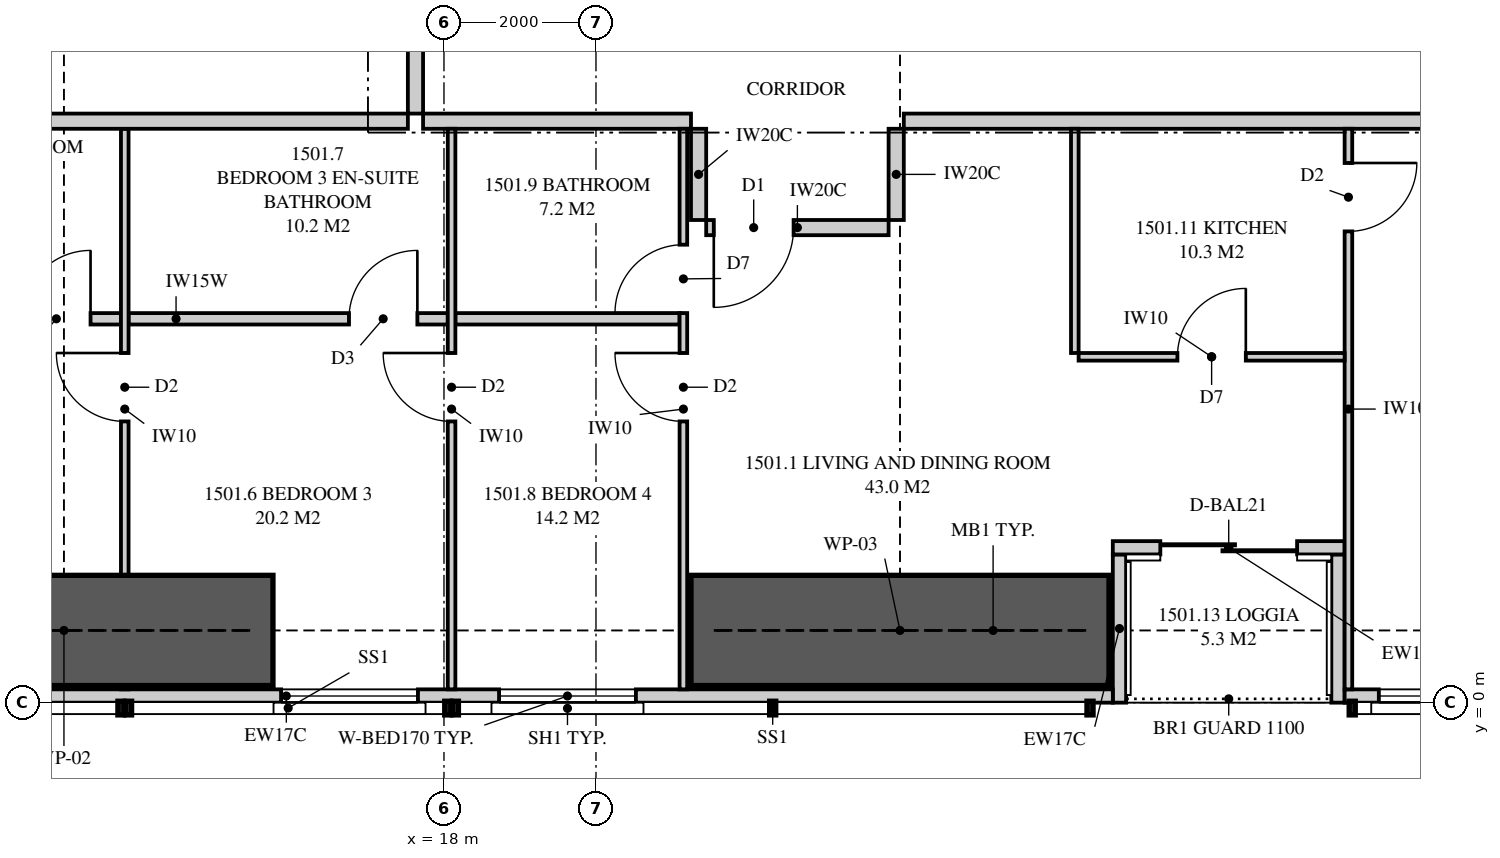
"""IFC4 building model, lengths in metres.
Left out: names, types, materials, properties, quantities, classifications, styles, units other than length and angle.
Written with IfcOpenShell. Run it as: python <this file> out.ifc"""

import sys

from ifc_helpers import new_model, si_unit, direction, frame, frame_2d, origin, place, context, subcontext, project, spatial, polyline, rectangle, outline, extrude, element, fill, save


model = new_model("IFC4")
c1 = context("Model", 3, precision=1e-05, world=origin(), true_north=direction((0.0, 1.0)))
c2 = subcontext(c1, "Body", "Model", "MODEL_VIEW")
j1 = project(units=[si_unit("LENGTHUNIT", "METRE"), si_unit("PLANEANGLEUNIT", "RADIAN")], contexts=[c1])
p1 = place(None, origin())
s1 = spatial("IfcSite", under=j1, at=p1, CompositionType="ELEMENT")
p2 = place(p1, origin())
s2 = spatial("IfcBuilding", under=s1, at=p2, CompositionType="ELEMENT")
p3 = place(p2, frame((0.0, 0.0, 57.85)))
s3 = spatial("IfcBuildingStorey", under=s2, at=p3, CompositionType="ELEMENT", Elevation=57.85)
p4 = place(p3, frame((5.051, 0.087, 0.0), z_axis=(0.0, 0.0, 1.0), x_axis=(1.0, 0.0, 0.0)))
e1 = element("IfcWall", 1, at=p4, inside=s3, PredefinedType="SOLIDWALL", context=c2, shape_type="SweptSolid", body=[
    extrude(outline(polyline([(0.0, 0.0), (21.749, 0.0), (21.749, 2.15), (7.949, 2.15), (7.949, 3.11), (7.793, 3.11), (7.793, 2.15), (7.745, 2.15), (7.745, 3.11), (0.0, 3.11), (0.0, 0.0)])), frame((0.0, 0.087, 0.0), z_axis=(0.0, -1.0, 0.0), x_axis=(1.0, 0.0, 0.0)), (0.0, 0.0, 1.0), 0.175),
])
p5 = place(p4, frame((3.234, 0.0, 0.4)))
e2 = element("IfcOpeningElement", 2, at=p5, cuts=e1, PredefinedType="OPENING", context=c2, shape_type="SweptSolid", body=[
    extrude(rectangle(XDim=1.8, YDim=1.7, at=frame_2d((0.9, 0.85))), frame((0.0, 0.097, 0.0), z_axis=(0.0, -1.0, 0.0), x_axis=(1.0, 0.0, 0.0)), (0.0, 0.0, 1.0), 0.195),
])
p6 = place(p4, frame((10.806, 0.0, 0.4)))
e3 = element("IfcOpeningElement", 3, at=p6, cuts=e1, PredefinedType="OPENING", context=c2, shape_type="SweptSolid", body=[
    extrude(rectangle(XDim=1.8, YDim=1.7, at=frame_2d((0.9, 0.85))), frame((0.0, 0.097, 0.0), z_axis=(0.0, -1.0, 0.0), x_axis=(1.0, 0.0, 0.0)), (0.0, 0.0, 1.0), 0.195),
])
p7 = place(p4, frame((13.674, 0.0, 0.4)))
e4 = element("IfcOpeningElement", 4, at=p7, cuts=e1, PredefinedType="OPENING", context=c2, shape_type="SweptSolid", body=[
    extrude(rectangle(XDim=1.8, YDim=1.7, at=frame_2d((0.9, 0.85))), frame((0.0, 0.097, 0.0), z_axis=(0.0, -1.0, 0.0), x_axis=(1.0, 0.0, 0.0)), (0.0, 0.0, 1.0), 0.195),
])
p8 = place(p3, frame((29.85, 0.087, 0.0), z_axis=(0.0, 0.0, 1.0), x_axis=(1.0, 0.0, 0.0)))
e5 = element("IfcWall", 5, at=p8, inside=s3, PredefinedType="SOLIDWALL", context=c2, shape_type="SweptSolid", body=[
    extrude(outline(polyline([(0.0, 0.0), (8.05, 0.0), (8.05, 3.11), (5.354, 3.11), (5.354, 2.15), (5.306, 2.15), (5.306, 3.11), (5.15, 3.11), (5.15, 2.15), (0.0, 2.15), (0.0, 0.0)])), frame((0.0, 0.087, 0.0), z_axis=(0.0, -1.0, 0.0), x_axis=(1.0, 0.0, 0.0)), (0.0, 0.0, 1.0), 0.175),
])
p9 = place(p8, frame((0.45, 0.0, 0.4)))
e6 = element("IfcOpeningElement", 6, at=p9, cuts=e5, PredefinedType="OPENING", context=c2, shape_type="SweptSolid", body=[
    extrude(rectangle(XDim=1.8, YDim=1.7, at=frame_2d((0.9, 0.85))), frame((0.0, 0.097, 0.0), z_axis=(0.0, -1.0, 0.0), x_axis=(1.0, 0.0, 0.0)), (0.0, 0.0, 1.0), 0.195),
])
p10 = place(p3, frame((26.8, 2.038, 0.0), z_axis=(0.0, 0.0, 1.0), x_axis=(1.0, 0.0, 0.0)))
e7 = element("IfcWall", 7, at=p10, inside=s3, PredefinedType="SOLIDWALL", context=c2, shape_type="SweptSolid", body=[
    extrude(rectangle(XDim=3.05, YDim=0.175, at=frame_2d((1.525, 0.0))), origin(), (0.0, 0.0, 1.0), 3.11),
])
p11 = place(p10, frame((0.625, 0.0, 0.0)))
e8 = element("IfcOpeningElement", 8, at=p11, cuts=e7, PredefinedType="OPENING", context=c2, shape_type="SweptSolid", body=[
    extrude(rectangle(XDim=1.8, YDim=2.1, at=frame_2d((0.9, 1.05))), frame((0.0, 0.097, 0.0), z_axis=(0.0, -1.0, 0.0), x_axis=(1.0, 0.0, 0.0)), (0.0, 0.0, 1.0), 0.195),
])
for number, where, z_axis, x_axis in (
    (9, (26.887, 0.0, 0.0), (0.0, 0.0, 1.0), (0.0, 1.0, 0.0)),
    (10, (29.762, 0.0, 0.0), (0.0, 0.0, 1.0), (0.0, 1.0, 0.0)),
):
    element("IfcWall", number, at=place(p3, frame(where, z_axis=z_axis, x_axis=x_axis)), inside=s3, PredefinedType="SOLIDWALL", context=c2, shape_type="SweptSolid", body=[
        extrude(outline(polyline([(0.0, 0.0), (1.95, 0.0), (1.95, 3.11), (1.75, 3.11), (1.75, 2.15), (0.15, 2.15), (0.15, 3.11), (0.0, 3.11), (0.0, 0.0)])), frame((0.0, 0.087, 0.0), z_axis=(0.0, -1.0, 0.0), x_axis=(1.0, 0.0, 0.0)), (0.0, 0.0, 1.0), 0.175),
    ])
p12 = place(p3, frame((17.725, 7.65, 0.0), z_axis=(0.0, 0.0, 1.0), x_axis=(1.0, 0.0, 0.0)))
e11 = element("IfcWall", 11, at=p12, inside=s3, PredefinedType="PARTITIONING", context=c2, shape_type="SweptSolid", body=[
    extrude(rectangle(XDim=3.525, YDim=0.2, at=frame_2d((1.762, 0.0))), origin(), (0.0, 0.0, 1.0), 3.11),
])
p13 = place(p3, frame((13.8, 0.175, 0.0), z_axis=(0.0, 0.0, 1.0), x_axis=(0.0, 1.0, 0.0)))
e12 = element("IfcWall", 12, at=p13, inside=s3, PredefinedType="PARTITIONING", context=c2, shape_type="SweptSolid", body=[
    extrude(outline(polyline([(1.635, 2.15), (0.0, 2.15), (0.0, 0.0), (7.375, 0.0), (7.375, 3.11), (1.635, 3.11), (1.635, 2.15)]), holes=[polyline([(1.021, 0.133), (0.529, 0.133), (0.529, 0.923), (1.021, 0.923), (1.021, 0.133)]), polyline([(1.021, 1.227), (0.529, 1.227), (0.529, 2.017), (1.021, 2.017), (1.021, 1.227)])]), frame((0.0, 0.05, 0.0), z_axis=(0.0, -1.0, 0.0), x_axis=(1.0, 0.0, 0.0)), (0.0, 0.0, 1.0), 0.1),
])
p14 = place(p13, frame((3.525, 0.0, 0.0)))
e13 = element("IfcOpeningElement", 13, at=p14, cuts=e12, PredefinedType="OPENING", context=c2, shape_type="SweptSolid", body=[
    extrude(rectangle(XDim=0.9, YDim=2.1, at=frame_2d((0.45, 1.05))), frame((0.0, 0.06, 0.0), z_axis=(0.0, -1.0, 0.0), x_axis=(1.0, 0.0, 0.0)), (0.0, 0.0, 1.0), 0.12),
])
p15 = place(p3, frame((18.1, 0.175, 0.0), z_axis=(0.0, 0.0, 1.0), x_axis=(0.0, 1.0, 0.0)))
e14 = element("IfcWall", 14, at=p15, inside=s3, PredefinedType="PARTITIONING", context=c2, shape_type="SweptSolid", body=[
    extrude(outline(polyline([(0.0, 0.0), (7.375, 0.0), (7.375, 3.11), (1.635, 3.11), (1.635, 2.15), (0.0, 2.15), (0.0, 3.11), (0.0, 0.0)])), frame((0.0, 0.05, 0.0), z_axis=(0.0, -1.0, 0.0), x_axis=(1.0, 0.0, 0.0)), (0.0, 0.0, 1.0), 0.1),
])
p16 = place(p15, frame((3.525, 0.0, 0.0)))
e15 = element("IfcOpeningElement", 15, at=p16, cuts=e14, PredefinedType="OPENING", context=c2, shape_type="SweptSolid", body=[
    extrude(rectangle(XDim=0.9, YDim=2.1, at=frame_2d((0.45, 1.05))), frame((0.0, 0.06, 0.0), z_axis=(0.0, -1.0, 0.0), x_axis=(1.0, 0.0, 0.0)), (0.0, 0.0, 1.0), 0.12),
])
p17 = place(p3, frame((21.15, 0.175, 0.0), z_axis=(0.0, 0.0, 1.0), x_axis=(0.0, 1.0, 0.0)))
e16 = element("IfcWall", 16, at=p17, inside=s3, PredefinedType="PARTITIONING", context=c2, shape_type="SweptSolid", body=[
    extrude(outline(polyline([(0.0, 0.0), (7.375, 0.0), (7.375, 3.11), (1.635, 3.11), (1.635, 2.15), (0.0, 2.15), (0.0, 3.11), (0.0, 0.0)])), frame((0.0, 0.05, 0.0), z_axis=(0.0, -1.0, 0.0), x_axis=(1.0, 0.0, 0.0)), (0.0, 0.0, 1.0), 0.1),
])
p18 = place(p17, frame((3.525, 0.0, 0.0)))
e17 = element("IfcOpeningElement", 17, at=p18, cuts=e16, PredefinedType="OPENING", context=c2, shape_type="SweptSolid", body=[
    extrude(rectangle(XDim=0.9, YDim=2.1, at=frame_2d((0.45, 1.05))), frame((0.0, 0.06, 0.0), z_axis=(0.0, -1.0, 0.0), x_axis=(1.0, 0.0, 0.0)), (0.0, 0.0, 1.0), 0.12),
])
p19 = place(p17, frame((4.95, 0.0, 0.0)))
e18 = element("IfcOpeningElement", 18, at=p19, cuts=e16, PredefinedType="OPENING", context=c2, shape_type="SweptSolid", body=[
    extrude(rectangle(XDim=0.9, YDim=2.1, at=frame_2d((0.45, 1.05))), frame((0.0, 0.06, 0.0), z_axis=(0.0, -1.0, 0.0), x_axis=(1.0, 0.0, 0.0)), (0.0, 0.0, 1.0), 0.12),
])
p20 = place(p3, frame((7.85, 5.05, 0.0), z_axis=(0.0, 0.0, 1.0), x_axis=(1.0, 0.0, 0.0)))
e19 = element("IfcWall", 19, at=p20, inside=s3, PredefinedType="PLUMBINGWALL", context=c2, shape_type="SweptSolid", body=[
    extrude(outline(polyline([(0.0, 0.0), (5.9, 0.0), (5.9, 3.11), (5.462, 3.11), (5.462, 2.541), (4.838, 2.541), (4.838, 3.11), (3.635, 3.11), (3.635, 2.51), (1.065, 2.51), (1.065, 3.11), (0.0, 3.11), (0.0, 0.0)])), frame((0.0, 0.075, 0.0), z_axis=(0.0, -1.0, 0.0), x_axis=(1.0, 0.0, 0.0)), (0.0, 0.0, 1.0), 0.15),
])
p21 = place(p20, frame((4.6, 0.0, 0.0)))
e20 = element("IfcOpeningElement", 20, at=p21, cuts=e19, PredefinedType="OPENING", context=c2, shape_type="SweptSolid", body=[
    extrude(rectangle(XDim=0.9, YDim=2.1, at=frame_2d((0.45, 1.05))), frame((0.0, 0.085, 0.0), z_axis=(0.0, -1.0, 0.0), x_axis=(1.0, 0.0, 0.0)), (0.0, 0.0, 1.0), 0.17),
])
p22 = place(p3, frame((13.85, 5.05, 0.0), z_axis=(0.0, 0.0, 1.0), x_axis=(1.0, 0.0, 0.0)))
e21 = element("IfcWall", 21, at=p22, inside=s3, PredefinedType="PLUMBINGWALL", context=c2, shape_type="SweptSolid", body=[
    extrude(rectangle(XDim=4.2, YDim=0.15, at=frame_2d((2.1, 0.0))), origin(), (0.0, 0.0, 1.0), 3.11),
])
p23 = place(p22, frame((2.9, 0.0, 0.0)))
e22 = element("IfcOpeningElement", 22, at=p23, cuts=e21, PredefinedType="OPENING", context=c2, shape_type="SweptSolid", body=[
    extrude(rectangle(XDim=0.9, YDim=2.1, at=frame_2d((0.45, 1.05))), frame((0.0, 0.085, 0.0), z_axis=(0.0, -1.0, 0.0), x_axis=(1.0, 0.0, 0.0)), (0.0, 0.0, 1.0), 0.17),
])
p24 = place(p3, frame((18.15, 5.05, 0.0), z_axis=(0.0, 0.0, 1.0), x_axis=(1.0, 0.0, 0.0)))
e23 = element("IfcWall", 23, at=p24, inside=s3, PredefinedType="PLUMBINGWALL", context=c2, shape_type="SweptSolid", body=[
    extrude(rectangle(XDim=2.95, YDim=0.15, at=frame_2d((1.475, 0.0))), origin(), (0.0, 0.0, 1.0), 3.11),
])
p25 = place(p3, frame((29.9, 0.175, 0.0), z_axis=(0.0, 0.0, 1.0), x_axis=(0.0, 1.0, 0.0)))
e24 = element("IfcWall", 24, at=p25, inside=s3, PredefinedType="PARTITIONING", context=c2, shape_type="SweptSolid", body=[
    extrude(outline(polyline([(0.0, 0.0), (7.375, 0.0), (7.375, 3.11), (1.635, 3.11), (1.635, 2.15), (0.0, 2.15), (0.0, 3.11), (0.0, 0.0)])), frame((0.0, 0.05, 0.0), z_axis=(0.0, -1.0, 0.0), x_axis=(1.0, 0.0, 0.0)), (0.0, 0.0, 1.0), 0.1),
])
p26 = place(p25, frame((6.025, 0.0, 0.0)))
e25 = element("IfcOpeningElement", 25, at=p26, cuts=e24, PredefinedType="OPENING", context=c2, shape_type="SweptSolid", body=[
    extrude(rectangle(XDim=0.9, YDim=2.1, at=frame_2d((0.45, 1.05))), frame((0.0, 0.06, 0.0), z_axis=(0.0, -1.0, 0.0), x_axis=(1.0, 0.0, 0.0)), (0.0, 0.0, 1.0), 0.12),
])
p27 = place(p3, frame((26.35, 4.55, 0.0), z_axis=(0.0, 0.0, 1.0), x_axis=(1.0, 0.0, 0.0)))
e26 = element("IfcWall", 26, at=p27, inside=s3, PredefinedType="PARTITIONING", context=c2, shape_type="SweptSolid", body=[
    extrude(rectangle(XDim=3.5, YDim=0.1, at=frame_2d((1.75, 0.0))), origin(), (0.0, 0.0, 1.0), 3.11),
])
p28 = place(p27, frame((1.3, 0.0, 0.0)))
e27 = element("IfcOpeningElement", 27, at=p28, cuts=e26, PredefinedType="OPENING", context=c2, shape_type="SweptSolid", body=[
    extrude(rectangle(XDim=0.9, YDim=2.1, at=frame_2d((0.45, 1.05))), frame((0.0, 0.06, 0.0), z_axis=(0.0, -1.0, 0.0), x_axis=(1.0, 0.0, 0.0)), (0.0, 0.0, 1.0), 0.12),
])
p29 = place(p3, frame((26.3, 4.6, 0.0), z_axis=(0.0, 0.0, 1.0), x_axis=(0.0, 1.0, 0.0)))
e28 = element("IfcWall", 28, at=p29, inside=s3, PredefinedType="PARTITIONING", context=c2, shape_type="SweptSolid", body=[
    extrude(rectangle(XDim=2.95, YDim=0.1, at=frame_2d((1.475, 0.0))), origin(), (0.0, 0.0, 1.0), 3.11),
])
p30 = place(p3, frame((2.0, 7.65, 0.0), z_axis=(0.0, 0.0, 1.0), x_axis=(1.0, 0.0, 0.0)))
e29 = element("IfcWall", 29, at=p30, inside=s3, PredefinedType="PARTITIONING", context=c2, shape_type="SweptSolid", body=[
    extrude(outline(polyline([(0.0, 0.0), (15.525, 0.0), (15.525, 3.11), (11.337, 3.11), (11.337, 2.541), (10.663, 2.541), (10.663, 3.11), (9.51, 3.11), (9.51, 2.51), (6.89, 2.51), (6.89, 3.11), (2.969, 3.11), (2.969, 2.541), (2.74, 2.541), (2.74, 2.15), (0.896, 2.15), (0.896, 3.11), (0.0, 3.11), (0.0, 0.0)])), frame((0.0, 0.1, 0.0), z_axis=(0.0, -1.0, 0.0), x_axis=(1.0, 0.0, 0.0)), (0.0, 0.0, 1.0), 0.2),
])
p31 = place(p3, frame((17.625, 7.75, 0.0), z_axis=(0.0, 0.0, 1.0), x_axis=(0.0, 1.0, 0.0)))
e30 = element("IfcWall", 30, at=p31, inside=s3, PredefinedType="PARTITIONING", context=c2, shape_type="SweptSolid", body=[
    extrude(outline(polyline([(0.0, 0.0), (16.25, 0.0), (16.25, 3.11), (5.587, 3.11), (5.587, 2.541), (4.913, 2.541), (4.913, 3.11), (0.0, 3.11), (0.0, 0.0)])), frame((0.0, 0.1, 0.0), z_axis=(0.0, -1.0, 0.0), x_axis=(1.0, 0.0, 0.0)), (0.0, 0.0, 1.0), 0.2),
])
p32 = place(p31, frame((7.075, 0.0, 0.0)))
e31 = element("IfcOpeningElement", 31, at=p32, cuts=e30, PredefinedType="OPENING", context=c2, shape_type="SweptSolid", body=[
    extrude(rectangle(XDim=1.05, YDim=2.2, at=frame_2d((0.525, 1.1))), frame((0.0, 0.11, 0.0), z_axis=(0.0, -1.0, 0.0), x_axis=(1.0, 0.0, 0.0)), (0.0, 0.0, 1.0), 0.22),
])
p33 = place(p3, frame((24.05, 7.65, 0.0), z_axis=(0.0, 0.0, 1.0), x_axis=(1.0, 0.0, 0.0)))
e32 = element("IfcWall", 32, at=p33, inside=s3, PredefinedType="PARTITIONING", context=c2, shape_type="SweptSolid", body=[
    extrude(outline(polyline([(0.0, 0.0), (11.65, 0.0), (11.65, 3.11), (11.287, 3.11), (11.287, 2.541), (10.613, 2.541), (10.613, 3.11), (0.287, 3.11), (0.287, 2.541), (0.0, 2.541), (0.0, 3.11), (0.0, 0.0)])), frame((0.0, 0.1, 0.0), z_axis=(0.0, -1.0, 0.0), x_axis=(1.0, 0.0, 0.0)), (0.0, 0.0, 1.0), 0.2),
])
p34 = place(p3, frame((21.45, 6.25, 0.0), z_axis=(0.0, 0.0, 1.0), x_axis=(1.0, 0.0, 0.0)))
e33 = element("IfcWall", 33, at=p34, inside=s3, PredefinedType="PARTITIONING", context=c2, shape_type="SweptSolid", body=[
    extrude(outline(polyline([(0.0, 0.0), (2.4, 0.0), (2.4, 3.11), (2.4, 2.541), (2.213, 2.541), (2.213, 3.11), (0.0, 3.11), (0.0, 0.0)])), frame((0.0, 0.1, 0.0), z_axis=(0.0, -1.0, 0.0), x_axis=(1.0, 0.0, 0.0)), (0.0, 0.0, 1.0), 0.2),
])
p35 = place(p34, frame((0.1, 0.0, 0.0)))
e34 = element("IfcOpeningElement", 34, at=p35, cuts=e33, PredefinedType="OPENING", context=c2, shape_type="SweptSolid", body=[
    extrude(rectangle(XDim=1.05, YDim=2.2, at=frame_2d((0.525, 1.1))), frame((0.0, 0.11, 0.0), z_axis=(0.0, -1.0, 0.0), x_axis=(1.0, 0.0, 0.0)), (0.0, 0.0, 1.0), 0.22),
])
p36 = place(p3, frame((21.35, 7.55, 0.0), z_axis=(0.0, 0.0, 1.0), x_axis=(0.0, -1.0, 0.0)))
e35 = element("IfcWall", 35, at=p36, inside=s3, PredefinedType="PARTITIONING", context=c2, shape_type="SweptSolid", body=[
    extrude(rectangle(XDim=1.2, YDim=0.2, at=frame_2d((0.6, 0.0))), origin(), (0.0, 0.0, 1.0), 3.11),
])
p37 = place(p3, frame((23.95, 7.55, 0.0), z_axis=(0.0, 0.0, 1.0), x_axis=(0.0, -1.0, 0.0)))
e36 = element("IfcWall", 36, at=p37, inside=s3, PredefinedType="PARTITIONING", context=c2, shape_type="SweptSolid", body=[
    extrude(outline(polyline([(0.0, 0.0), (1.2, 0.0), (1.2, 3.11), (1.2, 2.541), (0.0, 2.541), (0.0, 3.11), (0.0, 0.0)])), frame((0.0, 0.1, 0.0), z_axis=(0.0, -1.0, 0.0), x_axis=(1.0, 0.0, 0.0)), (0.0, 0.0, 1.0), 0.2),
])
for number, where, z_axis, x_axis in (
    (37, (10.25, 0.95, 0.0), (0.0, 0.0, 1.0), (1.0, 0.0, 0.0)),
    (38, (21.25, 0.95, 0.0), (0.0, 0.0, 1.0), (1.0, 0.0, 0.0)),
):
    element("IfcWall", number, at=place(p3, frame(where, z_axis=z_axis, x_axis=x_axis)), inside=s3, PredefinedType="SHEAR", context=c2, shape_type="SweptSolid", body=[
        extrude(rectangle(XDim=5.5, YDim=1.45, at=frame_2d((2.75, 0.0))), origin(), (0.0, 0.0, 1.0), 3.35),
    ])
p38 = place(p6, origin())
e39 = element("IfcWindow", 39, at=p38, inside=s3, PartitioningType="SINGLE_PANEL", PredefinedType="WINDOW", context=c2, shape_type="SweptSolid", body=[
    extrude(rectangle(XDim=1.8, YDim=1.7, at=frame_2d((0.9, 0.85))), frame((0.0, 0.03, 0.0), z_axis=(0.0, -1.0, 0.0), x_axis=(1.0, 0.0, 0.0)), (0.0, 0.0, 1.0), 0.06),
])
fill(e3, e39)
p39 = place(p7, origin())
e40 = element("IfcWindow", 40, at=p39, inside=s3, PartitioningType="SINGLE_PANEL", PredefinedType="WINDOW", context=c2, shape_type="SweptSolid", body=[
    extrude(rectangle(XDim=1.8, YDim=1.7, at=frame_2d((0.9, 0.85))), frame((0.0, 0.03, 0.0), z_axis=(0.0, -1.0, 0.0), x_axis=(1.0, 0.0, 0.0)), (0.0, 0.0, 1.0), 0.06),
])
fill(e4, e40)
p40 = place(p11, origin())
e41 = element("IfcDoor", 41, at=p40, inside=s3, OperationType="SLIDING_TO_LEFT", PredefinedType="DOOR", context=c2, shape_type="SweptSolid", body=[
    extrude(rectangle(XDim=1.8, YDim=2.1, at=frame_2d((0.9, 1.05))), frame((0.0, 0.025, 0.0), z_axis=(0.0, -1.0, 0.0), x_axis=(1.0, 0.0, 0.0)), (0.0, 0.0, 1.0), 0.05),
])
fill(e8, e41)
p41 = place(p9, origin())
e42 = element("IfcWindow", 42, at=p41, inside=s3, PartitioningType="SINGLE_PANEL", PredefinedType="WINDOW", context=c2, shape_type="SweptSolid", body=[
    extrude(rectangle(XDim=1.8, YDim=1.7, at=frame_2d((0.9, 0.85))), frame((0.0, 0.03, 0.0), z_axis=(0.0, -1.0, 0.0), x_axis=(1.0, 0.0, 0.0)), (0.0, 0.0, 1.0), 0.06),
])
fill(e6, e42)
p42 = place(p35, frame((1.05, 0.0, 0.0), z_axis=(0.0, 0.0, 1.0), x_axis=(-1.0, 0.0, 0.0)))
e43 = element("IfcDoor", 43, at=p42, inside=s3, OperationType="SINGLE_SWING_RIGHT", PredefinedType="DOOR", context=c2, shape_type="SweptSolid", body=[
    extrude(rectangle(XDim=1.05, YDim=2.2, at=frame_2d((0.525, 1.1))), frame((0.0, 0.025, 0.0), z_axis=(0.0, -1.0, 0.0), x_axis=(1.0, 0.0, 0.0)), (0.0, 0.0, 1.0), 0.05),
])
fill(e34, e43)
p43 = place(p14, origin())
e44 = element("IfcDoor", 44, at=p43, inside=s3, OperationType="SINGLE_SWING_RIGHT", PredefinedType="DOOR", context=c2, shape_type="SweptSolid", body=[
    extrude(rectangle(XDim=0.9, YDim=2.1, at=frame_2d((0.45, 1.05))), frame((0.0, 0.025, 0.0), z_axis=(0.0, -1.0, 0.0), x_axis=(1.0, 0.0, 0.0)), (0.0, 0.0, 1.0), 0.05),
])
fill(e13, e44)
p44 = place(p21, origin())
e45 = element("IfcDoor", 45, at=p44, inside=s3, OperationType="SINGLE_SWING_RIGHT", PredefinedType="DOOR", context=c2, shape_type="SweptSolid", body=[
    extrude(rectangle(XDim=0.9, YDim=2.1, at=frame_2d((0.45, 1.05))), frame((0.0, 0.025, 0.0), z_axis=(0.0, -1.0, 0.0), x_axis=(1.0, 0.0, 0.0)), (0.0, 0.0, 1.0), 0.05),
])
fill(e20, e45)
p45 = place(p16, origin())
e46 = element("IfcDoor", 46, at=p45, inside=s3, OperationType="SINGLE_SWING_RIGHT", PredefinedType="DOOR", context=c2, shape_type="SweptSolid", body=[
    extrude(rectangle(XDim=0.9, YDim=2.1, at=frame_2d((0.45, 1.05))), frame((0.0, 0.025, 0.0), z_axis=(0.0, -1.0, 0.0), x_axis=(1.0, 0.0, 0.0)), (0.0, 0.0, 1.0), 0.05),
])
fill(e15, e46)
p46 = place(p23, origin())
e47 = element("IfcDoor", 47, at=p46, inside=s3, OperationType="SINGLE_SWING_RIGHT", PredefinedType="DOOR", context=c2, shape_type="SweptSolid", body=[
    extrude(rectangle(XDim=0.9, YDim=2.1, at=frame_2d((0.45, 1.05))), frame((0.0, 0.025, 0.0), z_axis=(0.0, -1.0, 0.0), x_axis=(1.0, 0.0, 0.0)), (0.0, 0.0, 1.0), 0.05),
])
fill(e22, e47)
p47 = place(p18, origin())
e48 = element("IfcDoor", 48, at=p47, inside=s3, OperationType="SINGLE_SWING_RIGHT", PredefinedType="DOOR", context=c2, shape_type="SweptSolid", body=[
    extrude(rectangle(XDim=0.9, YDim=2.1, at=frame_2d((0.45, 1.05))), frame((0.0, 0.025, 0.0), z_axis=(0.0, -1.0, 0.0), x_axis=(1.0, 0.0, 0.0)), (0.0, 0.0, 1.0), 0.05),
])
fill(e17, e48)
p48 = place(p19, origin())
e49 = element("IfcDoor", 49, at=p48, inside=s3, OperationType="SINGLE_SWING_LEFT", PredefinedType="DOOR", context=c2, shape_type="SweptSolid", body=[
    extrude(rectangle(XDim=0.9, YDim=2.1, at=frame_2d((0.45, 1.05))), frame((0.0, 0.025, 0.0), z_axis=(0.0, -1.0, 0.0), x_axis=(1.0, 0.0, 0.0)), (0.0, 0.0, 1.0), 0.05),
])
fill(e18, e49)
p49 = place(p26, frame((0.9, 0.0, 0.0), z_axis=(0.0, 0.0, 1.0), x_axis=(-1.0, 0.0, 0.0)))
e50 = element("IfcDoor", 50, at=p49, inside=s3, OperationType="SINGLE_SWING_LEFT", PredefinedType="DOOR", context=c2, shape_type="SweptSolid", body=[
    extrude(rectangle(XDim=0.9, YDim=2.1, at=frame_2d((0.45, 1.05))), frame((0.0, 0.025, 0.0), z_axis=(0.0, -1.0, 0.0), x_axis=(1.0, 0.0, 0.0)), (0.0, 0.0, 1.0), 0.05),
])
fill(e25, e50)
p50 = place(p28, origin())
e51 = element("IfcDoor", 51, at=p50, inside=s3, OperationType="SINGLE_SWING_RIGHT", PredefinedType="DOOR", context=c2, shape_type="SweptSolid", body=[
    extrude(rectangle(XDim=0.9, YDim=2.1, at=frame_2d((0.45, 1.05))), frame((0.0, 0.025, 0.0), z_axis=(0.0, -1.0, 0.0), x_axis=(1.0, 0.0, 0.0)), (0.0, 0.0, 1.0), 0.05),
])
fill(e27, e51)
save(model, sys.argv[1])
